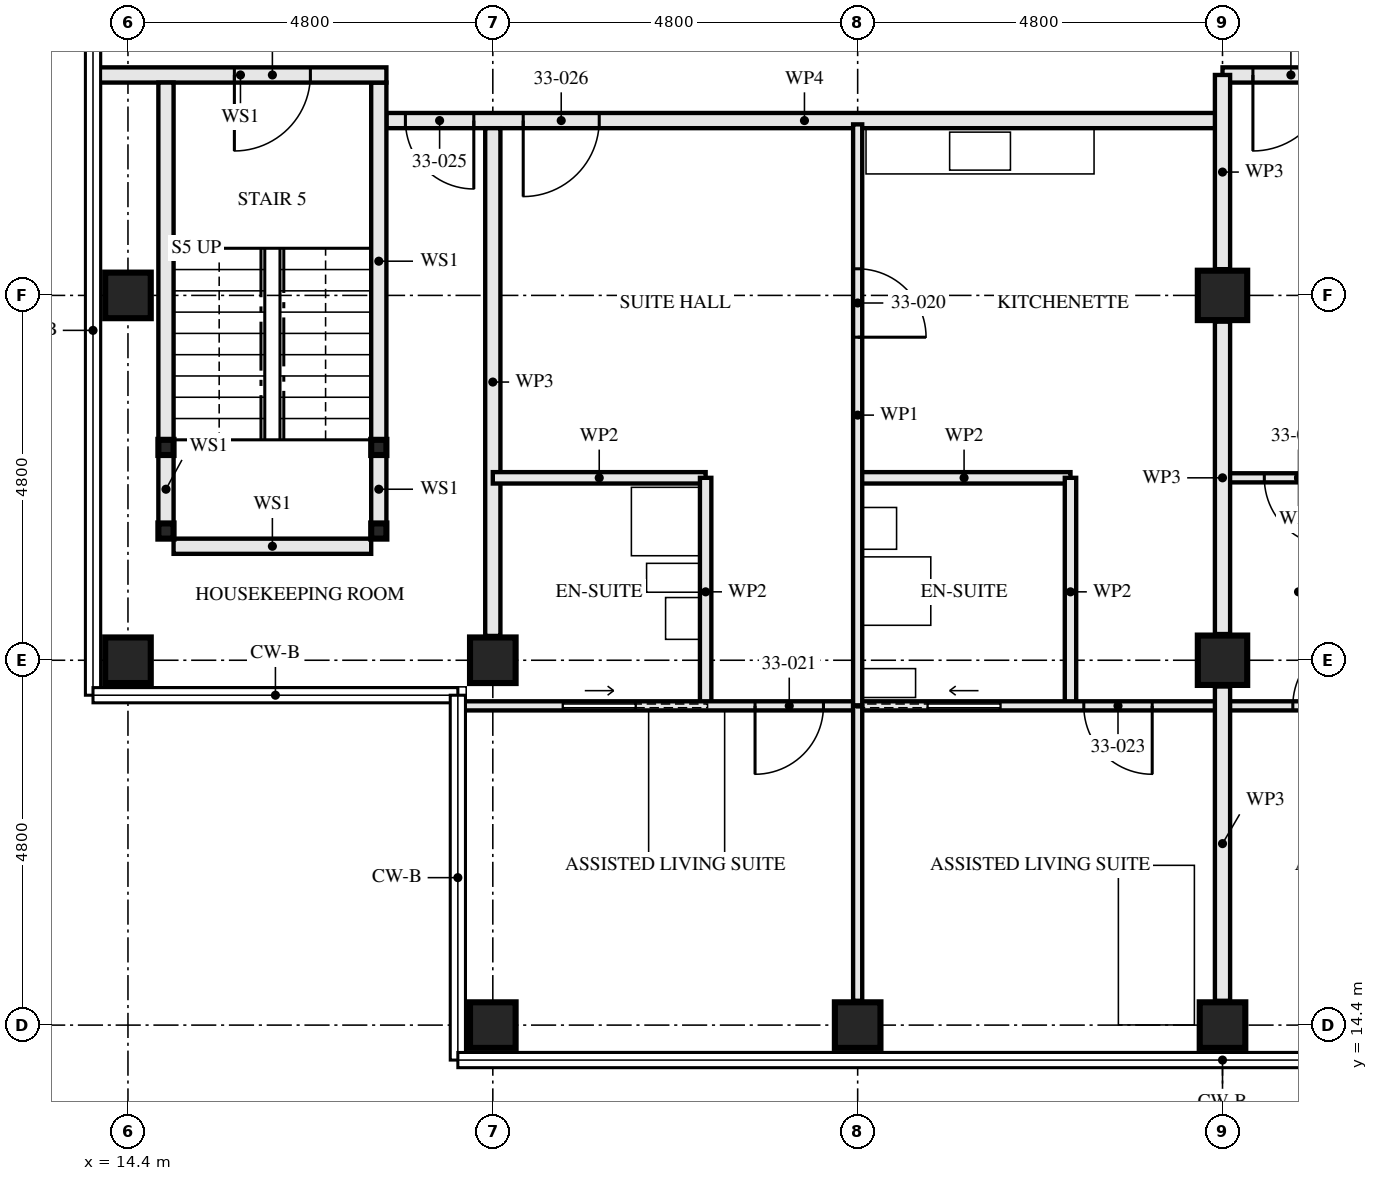
"""IFC4 building model, lengths in metres.
Left out: names, types, materials, properties, quantities, classifications, styles, units other than length and angle.
Written with IfcOpenShell. Run it as: python <this file> out.ifc"""

import sys

from ifc_helpers import new_model, si_unit, direction, frame, frame_2d, origin, origin_2d, place, context, subcontext, project, spatial, rectangle, hollow_rectangle, extrude, element, fill, save


model = new_model("IFC4")
c1 = context("Model", 3, precision=1e-05, world=origin(), true_north=direction((0.0, 1.0)))
c2 = subcontext(c1, "Body", "Model", "MODEL_VIEW")
j1 = project(units=[si_unit("LENGTHUNIT", "METRE"), si_unit("PLANEANGLEUNIT", "RADIAN")], contexts=[c1])
p1 = place(None, origin())
s1 = spatial("IfcSite", under=j1, at=p1, CompositionType="ELEMENT")
p2 = place(p1, origin())
s2 = spatial("IfcBuilding", under=s1, at=p2, CompositionType="ELEMENT")
p3 = place(p2, frame((0.0, 0.0, 122.5)))
s3 = spatial("IfcBuildingStorey", under=s2, at=p3, CompositionType="ELEMENT", Elevation=122.5)
for number, where, z_axis, x_axis in (
    (1, (14.4, 19.2, 0.0), (0.0, 0.0, 1.0), (0.0, 1.0, 0.0)),
    (2, (14.4, 24.0, 0.0), (0.0, 0.0, 1.0), (1.0, 0.0, 0.0)),
    (3, (19.2, 14.4, 0.0), (0.0, 0.0, 1.0), (0.0, 1.0, 0.0)),
    (4, (19.2, 19.2, 0.0), (0.0, 0.0, 1.0), (0.0, 1.0, 0.0)),
    (5, (24.0, 14.4, 0.0), (0.0, 0.0, 1.0), (0.0, 1.0, 0.0)),
    (6, (28.8, 14.4, 0.0), (0.0, 0.0, 1.0), (0.0, 1.0, 0.0)),
):
    element("IfcColumn", number, at=place(p3, frame(where, z_axis=z_axis, x_axis=x_axis)), inside=s3, PredefinedType="COLUMN", context=c2, shape_type="SweptSolid", body=[
        extrude(hollow_rectangle(XDim=0.6, YDim=0.6, WallThickness=0.08, at=origin_2d()), origin(), (0.0, 0.0, 1.0), 3.5),
    ])
for number, where, z_axis, x_axis in (
    (7, (28.8, 19.2, 0.0), (0.0, 0.0, 1.0), (1.0, 0.0, 0.0)),
    (8, (28.8, 24.0, 0.0), (0.0, 0.0, 1.0), (1.0, 0.0, 0.0)),
):
    element("IfcColumn", number, at=place(p3, frame(where, z_axis=z_axis, x_axis=x_axis)), inside=s3, PredefinedType="COLUMN", context=c2, shape_type="SweptSolid", body=[
        extrude(hollow_rectangle(XDim=0.65, YDim=0.65, WallThickness=0.05, at=origin_2d()), origin(), (0.0, 0.0, 1.0), 3.5),
    ])
for number, where, z_axis, x_axis in (
    (9, (14.9, 20.9, 0.0), (0.0, 0.0, 1.0), (1.0, 0.0, 0.0)),
    (10, (17.7, 20.9, 0.0), (0.0, 0.0, 1.0), (1.0, 0.0, 0.0)),
    (11, (14.9, 22.0, 0.0), (0.0, 0.0, 1.0), (1.0, 0.0, 0.0)),
    (12, (17.7, 22.0, 0.0), (0.0, 0.0, 1.0), (1.0, 0.0, 0.0)),
):
    element("IfcColumn", number, at=place(p3, frame(where, z_axis=z_axis, x_axis=x_axis)), inside=s3, PredefinedType="COLUMN", context=c2, shape_type="SweptSolid", body=[
        extrude(hollow_rectangle(XDim=0.2, YDim=0.2, WallThickness=0.008, at=origin_2d()), origin(), (0.0, 0.0, 1.0), 3.33),
    ])
p4 = place(p3, frame((14.9, 21.0, 0.0), z_axis=(0.0, 0.0, 1.0), x_axis=(0.0, 1.0, 0.0)))
e13 = element("IfcWall", 13, at=p4, inside=s3, PredefinedType="SOLIDWALL", context=c2, shape_type="SweptSolid", body=[
    extrude(rectangle(XDim=0.9, YDim=0.2, at=frame_2d((0.45, 0.0))), origin(), (0.0, 0.0, 1.0), 2.99),
])
p5 = place(p3, frame((14.9, 22.1, 0.0), z_axis=(0.0, 0.0, 1.0), x_axis=(0.0, 1.0, 0.0)))
e14 = element("IfcWall", 14, at=p5, inside=s3, PredefinedType="SOLIDWALL", context=c2, shape_type="SweptSolid", body=[
    extrude(rectangle(XDim=4.7, YDim=0.2, at=frame_2d((2.35, 0.0))), origin(), (0.0, 0.0, 1.0), 2.99),
])
p6 = place(p3, frame((17.7, 21.0, 0.0), z_axis=(0.0, 0.0, 1.0), x_axis=(0.0, 1.0, 0.0)))
e15 = element("IfcWall", 15, at=p6, inside=s3, PredefinedType="SOLIDWALL", context=c2, shape_type="SweptSolid", body=[
    extrude(rectangle(XDim=0.9, YDim=0.2, at=frame_2d((0.45, 0.0))), origin(), (0.0, 0.0, 1.0), 2.99),
])
p7 = place(p3, frame((17.7, 22.1, 0.0), z_axis=(0.0, 0.0, 1.0), x_axis=(0.0, 1.0, 0.0)))
e16 = element("IfcWall", 16, at=p7, inside=s3, PredefinedType="SOLIDWALL", context=c2, shape_type="SweptSolid", body=[
    extrude(rectangle(XDim=4.7, YDim=0.2, at=frame_2d((2.35, 0.0))), origin(), (0.0, 0.0, 1.0), 2.99),
])
p8 = place(p3, frame((15.0, 20.7, 0.0), z_axis=(0.0, 0.0, 1.0), x_axis=(1.0, 0.0, 0.0)))
e17 = element("IfcWall", 17, at=p8, inside=s3, PredefinedType="SOLIDWALL", context=c2, shape_type="SweptSolid", body=[
    extrude(rectangle(XDim=2.6, YDim=0.2, at=frame_2d((1.3, 0.0))), origin(), (0.0, 0.0, 1.0), 3.33),
])
p9 = place(p3, frame((13.96, 26.9, 0.0), z_axis=(0.0, 0.0, 1.0), x_axis=(1.0, 0.0, 0.0)))
e18 = element("IfcWall", 18, at=p9, inside=s3, PredefinedType="SOLIDWALL", context=c2, shape_type="SweptSolid", body=[
    extrude(rectangle(XDim=3.84, YDim=0.2, at=frame_2d((1.92, 0.0))), origin(), (0.0, 0.0, 1.0), 2.32),
])
p10 = place(p9, frame((1.84, 0.0, 0.0)))
e19 = element("IfcOpeningElement", 19, at=p10, cuts=e18, PredefinedType="OPENING", context=c2, shape_type="SweptSolid", body=[
    extrude(rectangle(XDim=1.0, YDim=2.1, at=frame_2d((0.5, 1.05))), frame((0.0, 0.111, 0.0), z_axis=(0.0, -1.0, 0.0), x_axis=(1.0, 0.0, 0.0)), (0.0, 0.0, 1.0), 0.221),
])
p11 = place(p3, frame((19.2, 19.52, 0.0), z_axis=(0.0, 0.0, 1.0), x_axis=(0.0, 1.0, 0.0)))
e20 = element("IfcWall", 20, at=p11, inside=s3, PredefinedType="PARTITIONING", context=c2, shape_type="SweptSolid", body=[
    extrude(rectangle(XDim=6.68, YDim=0.2, at=frame_2d((3.34, 0.0))), origin(), (0.0, 0.0, 1.0), 2.55),
])
p12 = place(p3, frame((22.0, 18.6, 0.0), z_axis=(0.0, 0.0, 1.0), x_axis=(0.0, 1.0, 0.0)))
e21 = element("IfcWall", 21, at=p12, inside=s3, PredefinedType="PARTITIONING", context=c2, shape_type="SweptSolid", body=[
    extrude(rectangle(XDim=3.0, YDim=0.15, at=frame_2d((1.5, 0.0))), origin(), (0.0, 0.0, 1.0), 2.55),
])
p13 = place(p3, frame((19.2, 21.6, 0.0), z_axis=(0.0, 0.0, 1.0), x_axis=(1.0, 0.0, 0.0)))
e22 = element("IfcWall", 22, at=p13, inside=s3, PredefinedType="PARTITIONING", context=c2, shape_type="SweptSolid", body=[
    extrude(rectangle(XDim=2.8, YDim=0.15, at=frame_2d((1.4, 0.0))), origin(), (0.0, 0.0, 1.0), 3.33),
])
p14 = place(p3, frame((26.8, 18.6, 0.0), z_axis=(0.0, 0.0, 1.0), x_axis=(0.0, 1.0, 0.0)))
e23 = element("IfcWall", 23, at=p14, inside=s3, PredefinedType="PARTITIONING", context=c2, shape_type="SweptSolid", body=[
    extrude(rectangle(XDim=3.0, YDim=0.15, at=frame_2d((1.5, 0.0))), origin(), (0.0, 0.0, 1.0), 2.55),
])
p15 = place(p3, frame((24.0, 21.6, 0.0), z_axis=(0.0, 0.0, 1.0), x_axis=(1.0, 0.0, 0.0)))
e24 = element("IfcWall", 24, at=p15, inside=s3, PredefinedType="PARTITIONING", context=c2, shape_type="SweptSolid", body=[
    extrude(rectangle(XDim=2.8, YDim=0.15, at=frame_2d((1.4, 0.0))), origin(), (0.0, 0.0, 1.0), 3.33),
])
p16 = place(p3, frame((24.0, 18.6, 0.0), z_axis=(0.0, 0.0, 1.0), x_axis=(0.0, 1.0, 0.0)))
e25 = element("IfcWall", 25, at=p16, inside=s3, PredefinedType="PARTITIONING", context=c2, shape_type="SweptSolid", body=[
    extrude(rectangle(XDim=7.65, YDim=0.12, at=frame_2d((3.825, 0.0))), origin(), (0.0, 0.0, 1.0), 2.55),
])
p17 = place(p16, frame((4.85, 0.0, 0.0)))
e26 = element("IfcOpeningElement", 26, at=p17, cuts=e25, PredefinedType="OPENING", context=c2, shape_type="SweptSolid", body=[
    extrude(rectangle(XDim=0.9, YDim=2.1, at=frame_2d((0.45, 1.05))), frame((0.0, 0.071, 0.0), z_axis=(0.0, -1.0, 0.0), x_axis=(1.0, 0.0, 0.0)), (0.0, 0.0, 1.0), 0.141),
])
p18 = place(p3, frame((18.76, 18.6, 0.0), z_axis=(0.0, 0.0, 1.0), x_axis=(1.0, 0.0, 0.0)))
e27 = element("IfcWall", 27, at=p18, inside=s3, PredefinedType="PARTITIONING", context=c2, shape_type="SweptSolid", body=[
    extrude(rectangle(XDim=5.24, YDim=0.12, at=frame_2d((2.62, 0.0))), origin(), (0.0, 0.0, 1.0), 2.32),
])
p19 = place(p18, frame((3.89, 0.0, 0.0)))
e28 = element("IfcOpeningElement", 28, at=p19, cuts=e27, PredefinedType="OPENING", context=c2, shape_type="SweptSolid", body=[
    extrude(rectangle(XDim=0.9, YDim=2.1, at=frame_2d((0.45, 1.05))), frame((0.0, 0.071, 0.0), z_axis=(0.0, -1.0, 0.0), x_axis=(1.0, 0.0, 0.0)), (0.0, 0.0, 1.0), 0.141),
])
p20 = place(p18, frame((1.365, 0.0, 0.0)))
e29 = element("IfcOpeningElement", 29, at=p20, cuts=e27, PredefinedType="OPENING", context=c2, shape_type="SweptSolid", body=[
    extrude(rectangle(XDim=0.95, YDim=2.1, at=frame_2d((0.475, 1.05))), frame((0.0, 0.071, 0.0), z_axis=(0.0, -1.0, 0.0), x_axis=(1.0, 0.0, 0.0)), (0.0, 0.0, 1.0), 0.141),
])
p21 = place(p3, frame((24.0, 18.6, 0.0), z_axis=(0.0, 0.0, 1.0), x_axis=(1.0, 0.0, 0.0)))
e30 = element("IfcWall", 30, at=p21, inside=s3, PredefinedType="PARTITIONING", context=c2, shape_type="SweptSolid", body=[
    extrude(rectangle(XDim=4.8, YDim=0.12, at=frame_2d((2.4, 0.0))), origin(), (0.0, 0.0, 1.0), 3.33),
])
p22 = place(p21, frame((2.975, 0.0, 0.0)))
e31 = element("IfcOpeningElement", 31, at=p22, cuts=e30, PredefinedType="OPENING", context=c2, shape_type="SweptSolid", body=[
    extrude(rectangle(XDim=0.9, YDim=2.1, at=frame_2d((0.45, 1.05))), frame((0.0, 0.071, 0.0), z_axis=(0.0, -1.0, 0.0), x_axis=(1.0, 0.0, 0.0)), (0.0, 0.0, 1.0), 0.141),
])
p23 = place(p21, frame((0.925, 0.0, 0.0)))
e32 = element("IfcOpeningElement", 32, at=p23, cuts=e30, PredefinedType="OPENING", context=c2, shape_type="SweptSolid", body=[
    extrude(rectangle(XDim=0.95, YDim=2.1, at=frame_2d((0.475, 1.05))), frame((0.0, 0.071, 0.0), z_axis=(0.0, -1.0, 0.0), x_axis=(1.0, 0.0, 0.0)), (0.0, 0.0, 1.0), 0.141),
])
p24 = place(p3, frame((24.0, 14.72, 0.0), z_axis=(0.0, 0.0, 1.0), x_axis=(0.0, 1.0, 0.0)))
e33 = element("IfcWall", 33, at=p24, inside=s3, PredefinedType="PARTITIONING", context=c2, shape_type="SweptSolid", body=[
    extrude(rectangle(XDim=3.88, YDim=0.12, at=frame_2d((1.94, 0.0))), origin(), (0.0, 0.0, 1.0), 3.33),
])
p25 = place(p3, frame((17.8, 26.3, 0.0), z_axis=(0.0, 0.0, 1.0), x_axis=(1.0, 0.0, 0.0)))
e34 = element("IfcWall", 34, at=p25, inside=s3, PredefinedType="PARTITIONING", context=c2, shape_type="SweptSolid", body=[
    extrude(rectangle(XDim=11.0, YDim=0.2, at=frame_2d((5.5, 0.0))), origin(), (0.0, 0.0, 1.0), 2.55),
])
p26 = place(p25, frame((0.25, 0.0, 0.0)))
e35 = element("IfcOpeningElement", 35, at=p26, cuts=e34, PredefinedType="OPENING", context=c2, shape_type="SweptSolid", body=[
    extrude(rectangle(XDim=0.9, YDim=2.1, at=frame_2d((0.45, 1.05))), frame((0.0, 0.111, 0.0), z_axis=(0.0, -1.0, 0.0), x_axis=(1.0, 0.0, 0.0)), (0.0, 0.0, 1.0), 0.221),
])
p27 = place(p25, frame((1.8, 0.0, 0.0)))
e36 = element("IfcOpeningElement", 36, at=p27, cuts=e34, PredefinedType="OPENING", context=c2, shape_type="SweptSolid", body=[
    extrude(rectangle(XDim=1.0, YDim=2.1, at=frame_2d((0.5, 1.05))), frame((0.0, 0.111, 0.0), z_axis=(0.0, -1.0, 0.0), x_axis=(1.0, 0.0, 0.0)), (0.0, 0.0, 1.0), 0.221),
])
p28 = place(p3, frame((28.8, 21.6, 0.0), z_axis=(0.0, 0.0, 1.0), x_axis=(1.0, 0.0, 0.0)))
e37 = element("IfcWall", 37, at=p28, inside=s3, PredefinedType="PARTITIONING", context=c2, shape_type="SweptSolid", body=[
    extrude(rectangle(XDim=2.0, YDim=0.12, at=frame_2d((1.0, 0.0))), origin(), (0.0, 0.0, 1.0), 3.33),
])
p29 = place(p28, frame((0.55, 0.0, 0.0)))
e38 = element("IfcOpeningElement", 38, at=p29, cuts=e37, PredefinedType="OPENING", context=c2, shape_type="SweptSolid", body=[
    extrude(rectangle(XDim=0.9, YDim=2.1, at=frame_2d((0.45, 1.05))), frame((0.0, 0.071, 0.0), z_axis=(0.0, -1.0, 0.0), x_axis=(1.0, 0.0, 0.0)), (0.0, 0.0, 1.0), 0.141),
])
p30 = place(p3, frame((28.8, 18.6, 0.0), z_axis=(0.0, 0.0, 1.0), x_axis=(1.0, 0.0, 0.0)))
e39 = element("IfcWall", 39, at=p30, inside=s3, PredefinedType="PARTITIONING", context=c2, shape_type="SweptSolid", body=[
    extrude(rectangle(XDim=4.8, YDim=0.12, at=frame_2d((2.4, 0.0))), origin(), (0.0, 0.0, 1.0), 3.33),
])
p31 = place(p30, frame((0.925, 0.0, 0.0)))
e40 = element("IfcOpeningElement", 40, at=p31, cuts=e39, PredefinedType="OPENING", context=c2, shape_type="SweptSolid", body=[
    extrude(rectangle(XDim=0.9, YDim=2.1, at=frame_2d((0.45, 1.05))), frame((0.0, 0.071, 0.0), z_axis=(0.0, -1.0, 0.0), x_axis=(1.0, 0.0, 0.0)), (0.0, 0.0, 1.0), 0.141),
])
p32 = place(p30, frame((2.925, 0.0, 0.0)))
e41 = element("IfcOpeningElement", 41, at=p32, cuts=e39, PredefinedType="OPENING", context=c2, shape_type="SweptSolid", body=[
    extrude(rectangle(XDim=0.95, YDim=2.1, at=frame_2d((0.475, 1.05))), frame((0.0, 0.071, 0.0), z_axis=(0.0, -1.0, 0.0), x_axis=(1.0, 0.0, 0.0)), (0.0, 0.0, 1.0), 0.141),
])
p33 = place(p3, frame((28.8, 26.9, 0.0), z_axis=(0.0, 0.0, 1.0), x_axis=(1.0, 0.0, 0.0)))
e42 = element("IfcWall", 42, at=p33, inside=s3, PredefinedType="PARTITIONING", context=c2, shape_type="SweptSolid", body=[
    extrude(rectangle(XDim=9.6, YDim=0.2, at=frame_2d((4.8, 0.0))), origin(), (0.0, 0.0, 1.0), 3.33),
])
p34 = place(p33, frame((0.4, 0.0, 0.0)))
e43 = element("IfcOpeningElement", 43, at=p34, cuts=e42, PredefinedType="OPENING", context=c2, shape_type="SweptSolid", body=[
    extrude(rectangle(XDim=1.0, YDim=2.1, at=frame_2d((0.5, 1.05))), frame((0.0, 0.111, 0.0), z_axis=(0.0, -1.0, 0.0), x_axis=(1.0, 0.0, 0.0)), (0.0, 0.0, 1.0), 0.221),
])
p35 = place(p33, frame((5.2, 0.0, 0.0)))
e44 = element("IfcOpeningElement", 44, at=p35, cuts=e42, PredefinedType="OPENING", context=c2, shape_type="SweptSolid", body=[
    extrude(rectangle(XDim=1.0, YDim=2.1, at=frame_2d((0.5, 1.05))), frame((0.0, 0.111, 0.0), z_axis=(0.0, -1.0, 0.0), x_axis=(1.0, 0.0, 0.0)), (0.0, 0.0, 1.0), 0.221),
])
p36 = place(p3, frame((28.8, 14.72, 0.0), z_axis=(0.0, 0.0, 1.0), x_axis=(0.0, 1.0, 0.0)))
e45 = element("IfcWall", 45, at=p36, inside=s3, PredefinedType="PARTITIONING", context=c2, shape_type="SweptSolid", body=[
    extrude(rectangle(XDim=4.135, YDim=0.2, at=frame_2d((2.067, 0.0))), origin(), (0.0, 0.0, 1.0), 2.32),
])
p37 = place(p3, frame((28.8, 19.545, 0.0), z_axis=(0.0, 0.0, 1.0), x_axis=(0.0, 1.0, 0.0)))
e46 = element("IfcWall", 46, at=p37, inside=s3, PredefinedType="PARTITIONING", context=c2, shape_type="SweptSolid", body=[
    extrude(rectangle(XDim=4.11, YDim=0.2, at=frame_2d((2.055, 0.0))), origin(), (0.0, 0.0, 1.0), 2.32),
])
p38 = place(p3, frame((28.8, 24.345, 0.0), z_axis=(0.0, 0.0, 1.0), x_axis=(0.0, 1.0, 0.0)))
e47 = element("IfcWall", 47, at=p38, inside=s3, PredefinedType="PARTITIONING", context=c2, shape_type="SweptSolid", body=[
    extrude(rectangle(XDim=2.555, YDim=0.2, at=frame_2d((1.277, 0.0))), origin(), (0.0, 0.0, 1.0), 2.32),
])
p39 = place(p10, frame((1.0, 0.0, 0.0), z_axis=(0.0, 0.0, 1.0), x_axis=(-1.0, 0.0, 0.0)))
e48 = element("IfcDoor", 48, at=p39, inside=s3, OperationType="SINGLE_SWING_LEFT", PredefinedType="DOOR", context=c2, shape_type="SweptSolid", body=[
    extrude(rectangle(XDim=1.0, YDim=2.1, at=frame_2d((0.5, 1.05))), frame((0.0, 0.032, 0.0), z_axis=(0.0, -1.0, 0.0), x_axis=(1.0, 0.0, 0.0)), (0.0, 0.0, 1.0), 0.064),
])
fill(e19, e48)
p40 = place(p17, frame((0.9, 0.0, 0.0), z_axis=(0.0, 0.0, 1.0), x_axis=(-1.0, 0.0, 0.0)))
e49 = element("IfcDoor", 49, at=p40, inside=s3, OperationType="SINGLE_SWING_LEFT", PredefinedType="DOOR", context=c2, shape_type="SweptSolid", body=[
    extrude(rectangle(XDim=0.9, YDim=2.1, at=frame_2d((0.45, 1.05))), frame((0.0, 0.022, 0.0), z_axis=(0.0, -1.0, 0.0), x_axis=(1.0, 0.0, 0.0)), (0.0, 0.0, 1.0), 0.044),
])
fill(e26, e49)
p41 = place(p19, frame((0.9, 0.0, 0.0), z_axis=(0.0, 0.0, 1.0), x_axis=(-1.0, 0.0, 0.0)))
e50 = element("IfcDoor", 50, at=p41, inside=s3, OperationType="SINGLE_SWING_LEFT", PredefinedType="DOOR", context=c2, shape_type="SweptSolid", body=[
    extrude(rectangle(XDim=0.9, YDim=2.1, at=frame_2d((0.45, 1.05))), frame((0.0, 0.022, 0.0), z_axis=(0.0, -1.0, 0.0), x_axis=(1.0, 0.0, 0.0)), (0.0, 0.0, 1.0), 0.044),
])
fill(e28, e50)
p42 = place(p20, origin())
e51 = element("IfcDoor", 51, at=p42, inside=s3, OperationType="SLIDING_TO_LEFT", PredefinedType="DOOR", context=c2, shape_type="SweptSolid", body=[
    extrude(rectangle(XDim=0.95, YDim=2.1, at=frame_2d((0.475, 1.05))), frame((0.0, 0.022, 0.0), z_axis=(0.0, -1.0, 0.0), x_axis=(1.0, 0.0, 0.0)), (0.0, 0.0, 1.0), 0.044),
])
fill(e29, e51)
p43 = place(p22, frame((0.9, 0.0, 0.0), z_axis=(0.0, 0.0, 1.0), x_axis=(-1.0, 0.0, 0.0)))
e52 = element("IfcDoor", 52, at=p43, inside=s3, OperationType="SINGLE_SWING_RIGHT", PredefinedType="DOOR", context=c2, shape_type="SweptSolid", body=[
    extrude(rectangle(XDim=0.9, YDim=2.1, at=frame_2d((0.45, 1.05))), frame((0.0, 0.022, 0.0), z_axis=(0.0, -1.0, 0.0), x_axis=(1.0, 0.0, 0.0)), (0.0, 0.0, 1.0), 0.044),
])
fill(e31, e52)
p44 = place(p23, origin())
e53 = element("IfcDoor", 53, at=p44, inside=s3, OperationType="SLIDING_TO_RIGHT", PredefinedType="DOOR", context=c2, shape_type="SweptSolid", body=[
    extrude(rectangle(XDim=0.95, YDim=2.1, at=frame_2d((0.475, 1.05))), frame((0.0, 0.022, 0.0), z_axis=(0.0, -1.0, 0.0), x_axis=(1.0, 0.0, 0.0)), (0.0, 0.0, 1.0), 0.044),
])
fill(e32, e53)
p45 = place(p26, frame((0.9, 0.0, 0.0), z_axis=(0.0, 0.0, 1.0), x_axis=(-1.0, 0.0, 0.0)))
e54 = element("IfcDoor", 54, at=p45, inside=s3, OperationType="SINGLE_SWING_RIGHT", PredefinedType="DOOR", context=c2, shape_type="SweptSolid", body=[
    extrude(rectangle(XDim=0.9, YDim=2.1, at=frame_2d((0.45, 1.05))), frame((0.0, 0.027, 0.0), z_axis=(0.0, -1.0, 0.0), x_axis=(1.0, 0.0, 0.0)), (0.0, 0.0, 1.0), 0.054),
])
fill(e35, e54)
p46 = place(p27, frame((1.0, 0.0, 0.0), z_axis=(0.0, 0.0, 1.0), x_axis=(-1.0, 0.0, 0.0)))
e55 = element("IfcDoor", 55, at=p46, inside=s3, OperationType="SINGLE_SWING_LEFT", PredefinedType="DOOR", context=c2, shape_type="SweptSolid", body=[
    extrude(rectangle(XDim=1.0, YDim=2.1, at=frame_2d((0.5, 1.05))), frame((0.0, 0.027, 0.0), z_axis=(0.0, -1.0, 0.0), x_axis=(1.0, 0.0, 0.0)), (0.0, 0.0, 1.0), 0.054),
])
fill(e36, e55)
p47 = place(p29, frame((0.9, 0.0, 0.0), z_axis=(0.0, 0.0, 1.0), x_axis=(-1.0, 0.0, 0.0)))
e56 = element("IfcDoor", 56, at=p47, inside=s3, OperationType="SINGLE_SWING_RIGHT", PredefinedType="DOOR", context=c2, shape_type="SweptSolid", body=[
    extrude(rectangle(XDim=0.9, YDim=2.1, at=frame_2d((0.45, 1.05))), frame((0.0, 0.022, 0.0), z_axis=(0.0, -1.0, 0.0), x_axis=(1.0, 0.0, 0.0)), (0.0, 0.0, 1.0), 0.044),
])
fill(e38, e56)
p48 = place(p31, origin())
e57 = element("IfcDoor", 57, at=p48, inside=s3, OperationType="SINGLE_SWING_LEFT", PredefinedType="DOOR", context=c2, shape_type="SweptSolid", body=[
    extrude(rectangle(XDim=0.9, YDim=2.1, at=frame_2d((0.45, 1.05))), frame((0.0, 0.022, 0.0), z_axis=(0.0, -1.0, 0.0), x_axis=(1.0, 0.0, 0.0)), (0.0, 0.0, 1.0), 0.044),
])
fill(e40, e57)
p49 = place(p34, frame((1.0, 0.0, 0.0), z_axis=(0.0, 0.0, 1.0), x_axis=(-1.0, 0.0, 0.0)))
e58 = element("IfcDoor", 58, at=p49, inside=s3, OperationType="SINGLE_SWING_LEFT", PredefinedType="DOOR", context=c2, shape_type="SweptSolid", body=[
    extrude(rectangle(XDim=1.0, YDim=2.1, at=frame_2d((0.5, 1.05))), frame((0.0, 0.027, 0.0), z_axis=(0.0, -1.0, 0.0), x_axis=(1.0, 0.0, 0.0)), (0.0, 0.0, 1.0), 0.054),
])
fill(e43, e58)
save(model, sys.argv[1])
